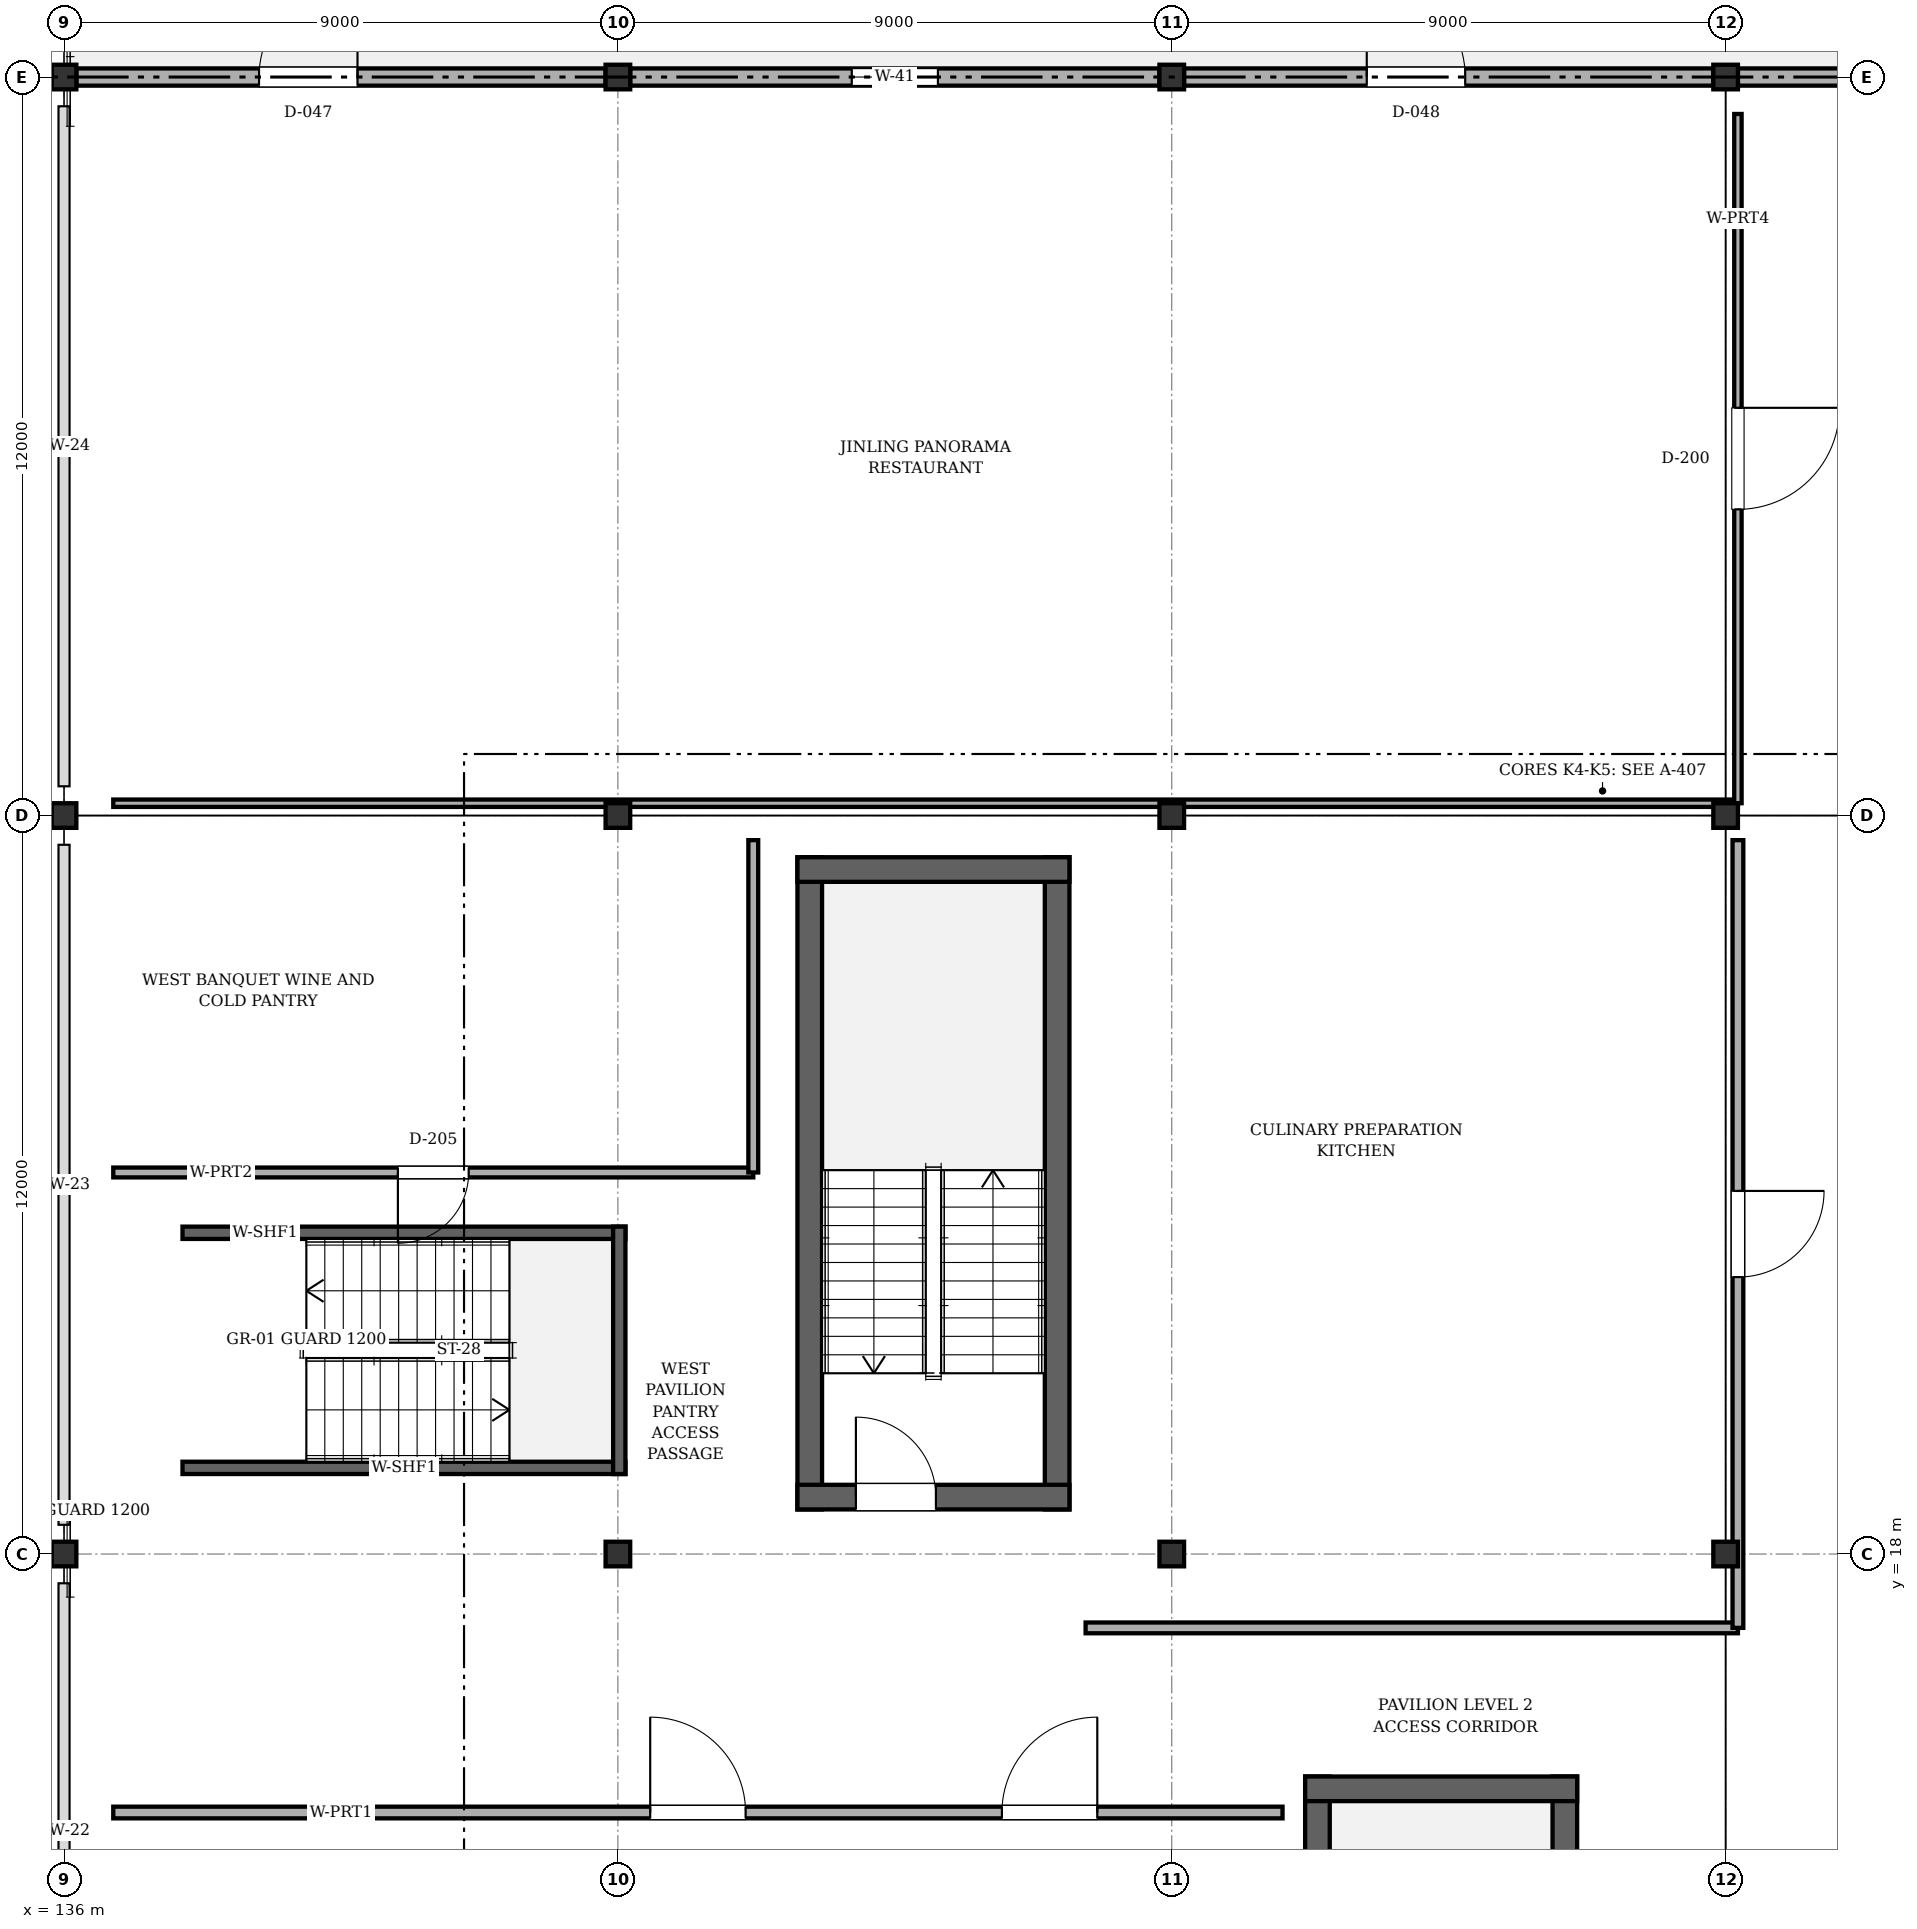
"""IFC4 building model, lengths in metres.
Left out: names, types, materials, properties, quantities, classifications, styles, units other than length and angle.
Written with IfcOpenShell. Run it as: python <this file> out.ifc"""

import sys

from ifc_helpers import new_model, si_unit, direction, frame, frame_2d, origin, origin_2d, place, context, subcontext, project, spatial, rectangle, i_section, extrude, element, fill, save


model = new_model("IFC4")
c1 = context("Model", 3, precision=1e-05, world=origin(), true_north=direction((0.0, 1.0)))
c2 = subcontext(c1, "Body", "Model", "MODEL_VIEW")
j1 = project(units=[si_unit("LENGTHUNIT", "METRE"), si_unit("PLANEANGLEUNIT", "RADIAN")], contexts=[c1])
p1 = place(None, origin())
s1 = spatial("IfcSite", under=j1, at=p1, CompositionType="ELEMENT")
p2 = place(p1, origin())
s2 = spatial("IfcBuilding", under=s1, at=p2, CompositionType="ELEMENT")
p3 = place(p2, frame((0.0, 0.0, 10.8)))
s3 = spatial("IfcBuildingStorey", under=s2, at=p3, CompositionType="ELEMENT", Elevation=10.8)
for number, where, z_axis, x_axis in (
    (1, (136.0, 18.0, 0.0), (0.0, 0.0, 1.0), (1.0, 0.0, 0.0)),
    (2, (136.0, 30.0, 0.0), (0.0, 0.0, 1.0), (1.0, 0.0, 0.0)),
    (3, (136.0, 42.0, 0.0), (0.0, 0.0, 1.0), (1.0, 0.0, 0.0)),
    (4, (145.0, 18.0, 0.0), (0.0, 0.0, 1.0), (1.0, 0.0, 0.0)),
    (5, (145.0, 30.0, 0.0), (0.0, 0.0, 1.0), (1.0, 0.0, 0.0)),
    (6, (145.0, 42.0, 0.0), (0.0, 0.0, 1.0), (1.0, 0.0, 0.0)),
    (7, (154.0, 18.0, 0.0), (0.0, 0.0, 1.0), (1.0, 0.0, 0.0)),
    (8, (154.0, 30.0, 0.0), (0.0, 0.0, 1.0), (1.0, 0.0, 0.0)),
    (9, (154.0, 42.0, 0.0), (0.0, 0.0, 1.0), (1.0, 0.0, 0.0)),
    (10, (163.0, 18.0, 0.0), (0.0, 0.0, 1.0), (1.0, 0.0, 0.0)),
    (11, (163.0, 30.0, 0.0), (0.0, 0.0, 1.0), (1.0, 0.0, 0.0)),
    (12, (163.0, 42.0, 0.0), (0.0, 0.0, 1.0), (1.0, 0.0, 0.0)),
):
    element("IfcColumn", number, at=place(p3, frame(where, z_axis=z_axis, x_axis=x_axis)), inside=s3, PredefinedType="COLUMN", context=c2, shape_type="SweptSolid", body=[
        extrude(i_section(OverallWidth=0.4, OverallDepth=0.4, WebThickness=0.013, FlangeThickness=0.021, FilletRadius=0.022, at=origin_2d()), origin(), (0.0, 0.0, 1.0), 3.6),
    ])
p4 = place(p3, frame((136.2, 42.0, 0.0), z_axis=(0.0, 0.0, 1.0), x_axis=(1.0, 0.0, 0.0)))
e13 = element("IfcWall", 13, at=p4, inside=s3, PredefinedType="SOLIDWALL", context=c2, shape_type="SweptSolid", body=[
    extrude(rectangle(XDim=8.6, YDim=0.28, at=frame_2d((4.3, 0.0))), origin(), (0.0, 0.0, 1.0), 2.795),
])
p5 = place(p4, frame((2.969, 0.0, 0.0)))
e14 = element("IfcOpeningElement", 14, at=p5, cuts=e13, PredefinedType="OPENING", context=c2, shape_type="SweptSolid", body=[
    extrude(rectangle(XDim=1.6, YDim=2.3, at=frame_2d((0.8, 1.15))), frame((0.0, 0.15, 0.0), z_axis=(0.0, -1.0, 0.0), x_axis=(1.0, 0.0, 0.0)), (0.0, 0.0, 1.0), 0.3),
])
p6 = place(p3, frame((145.2, 42.0, 0.0), z_axis=(0.0, 0.0, 1.0), x_axis=(1.0, 0.0, 0.0)))
e15 = element("IfcWall", 15, at=p6, inside=s3, PredefinedType="SOLIDWALL", context=c2, shape_type="SweptSolid", body=[
    extrude(rectangle(XDim=8.6, YDim=0.28, at=frame_2d((4.3, 0.0))), origin(), (0.0, 0.0, 1.0), 2.795),
])
p7 = place(p6, frame((3.6, 0.0, 0.75)))
e16 = element("IfcOpeningElement", 16, at=p7, cuts=e15, PredefinedType="OPENING", context=c2, shape_type="SweptSolid", body=[
    extrude(rectangle(XDim=1.4, YDim=1.55, at=frame_2d((0.7, 0.775))), frame((0.0, 0.15, 0.0), z_axis=(0.0, -1.0, 0.0), x_axis=(1.0, 0.0, 0.0)), (0.0, 0.0, 1.0), 0.3),
])
p8 = place(p3, frame((154.2, 42.0, 0.0), z_axis=(0.0, 0.0, 1.0), x_axis=(1.0, 0.0, 0.0)))
e17 = element("IfcWall", 17, at=p8, inside=s3, PredefinedType="SOLIDWALL", context=c2, shape_type="SweptSolid", body=[
    extrude(rectangle(XDim=8.6, YDim=0.28, at=frame_2d((4.3, 0.0))), origin(), (0.0, 0.0, 1.0), 2.795),
])
p9 = place(p8, frame((2.969, 0.0, 0.0)))
e18 = element("IfcOpeningElement", 18, at=p9, cuts=e17, PredefinedType="OPENING", context=c2, shape_type="SweptSolid", body=[
    extrude(rectangle(XDim=1.6, YDim=2.3, at=frame_2d((0.8, 1.15))), frame((0.0, 0.15, 0.0), z_axis=(0.0, -1.0, 0.0), x_axis=(1.0, 0.0, 0.0)), (0.0, 0.0, 1.0), 0.3),
])
p10 = place(p3, frame((163.2, 42.0, 0.0), z_axis=(0.0, 0.0, 1.0), x_axis=(1.0, 0.0, 0.0)))
e19 = element("IfcWall", 19, at=p10, inside=s3, PredefinedType="SOLIDWALL", context=c2, shape_type="SweptSolid", body=[
    extrude(rectangle(XDim=8.6, YDim=0.28, at=frame_2d((4.3, 0.0))), origin(), (0.0, 0.0, 1.0), 2.795),
])
p11 = place(p10, frame((3.6, 0.0, 0.75)))
e20 = element("IfcOpeningElement", 20, at=p11, cuts=e19, PredefinedType="OPENING", context=c2, shape_type="SweptSolid", body=[
    extrude(rectangle(XDim=1.4, YDim=1.55, at=frame_2d((0.7, 0.775))), frame((0.0, 0.15, 0.0), z_axis=(0.0, -1.0, 0.0), x_axis=(1.0, 0.0, 0.0)), (0.0, 0.0, 1.0), 0.3),
])
for number, where, z_axis, x_axis in (
    (21, (152.137, 18.725, 0.0), (0.0, 0.0, 1.0), (0.0, 1.0, 0.0)),
    (22, (148.117, 29.323, 0.0), (0.0, 0.0, 1.0), (0.0, -1.0, 0.0)),
):
    element("IfcWall", number, at=place(p3, frame(where, z_axis=z_axis, x_axis=x_axis)), inside=s3, PredefinedType="SHEAR", context=c2, shape_type="SweptSolid", body=[
        extrude(rectangle(XDim=10.597, YDim=0.4, at=frame_2d((5.299, 0.0))), origin(), (0.0, 0.0, 1.0), 3.4),
    ])
p12 = place(p3, frame((152.337, 29.123, 0.0), z_axis=(0.0, 0.0, 1.0), x_axis=(-1.0, 0.0, 0.0)))
e23 = element("IfcWall", 23, at=p12, inside=s3, PredefinedType="SHEAR", context=c2, shape_type="SweptSolid", body=[
    extrude(rectangle(XDim=4.42, YDim=0.4, at=frame_2d((2.21, 0.0))), origin(), (0.0, 0.0, 1.0), 3.4),
])
p13 = place(p3, frame((147.917, 18.925, 0.0), z_axis=(0.0, 0.0, 1.0), x_axis=(1.0, 0.0, 0.0)))
e24 = element("IfcWall", 24, at=p13, inside=s3, PredefinedType="SHEAR", context=c2, shape_type="SweptSolid", body=[
    extrude(rectangle(XDim=4.42, YDim=0.4, at=frame_2d((2.21, 0.0))), origin(), (0.0, 0.0, 1.0), 3.4),
])
p14 = place(p13, frame((0.95, 0.0, 0.0)))
e25 = element("IfcOpeningElement", 25, at=p14, cuts=e24, PredefinedType="OPENING", context=c2, shape_type="SweptSolid", body=[
    extrude(rectangle(XDim=1.3, YDim=2.1, at=frame_2d((0.65, 1.05))), frame((0.0, 0.21, 0.0), z_axis=(0.0, -1.0, 0.0), x_axis=(1.0, 0.0, 0.0)), (0.0, 0.0, 1.0), 0.42),
])
p15 = place(p3, frame((160.387, 3.788, 0.0), z_axis=(0.0, 0.0, 1.0), x_axis=(0.0, 1.0, 0.0)))
e26 = element("IfcWall", 26, at=p15, inside=s3, PredefinedType="SHEAR", context=c2, shape_type="SweptSolid", body=[
    extrude(rectangle(XDim=10.597, YDim=0.4, at=frame_2d((5.299, 0.0))), origin(), (0.0, 0.0, 1.0), 3.4),
])
p16 = place(p3, frame((156.367, 14.385, 0.0), z_axis=(0.0, 0.0, 1.0), x_axis=(0.0, -1.0, 0.0)))
e27 = element("IfcWall", 27, at=p16, inside=s3, PredefinedType="SHEAR", context=c2, shape_type="SweptSolid", body=[
    extrude(rectangle(XDim=10.597, YDim=0.4, at=frame_2d((5.299, 0.0))), origin(), (0.0, 0.0, 1.0), 3.4),
])
p17 = place(p16, frame((8.498, 0.0, 0.0)))
e28 = element("IfcOpeningElement", 28, at=p17, cuts=e27, PredefinedType="OPENING", context=c2, shape_type="SweptSolid", body=[
    extrude(rectangle(XDim=1.3, YDim=2.1, at=frame_2d((0.65, 1.05))), frame((0.0, 0.21, 0.0), z_axis=(0.0, -1.0, 0.0), x_axis=(1.0, 0.0, 0.0)), (0.0, 0.0, 1.0), 0.42),
])
p18 = place(p3, frame((160.587, 14.185, 0.0), z_axis=(0.0, 0.0, 1.0), x_axis=(-1.0, 0.0, 0.0)))
e29 = element("IfcWall", 29, at=p18, inside=s3, PredefinedType="SHEAR", context=c2, shape_type="SweptSolid", body=[
    extrude(rectangle(XDim=4.42, YDim=0.4, at=frame_2d((2.21, 0.0))), origin(), (0.0, 0.0, 1.0), 3.4),
])
for number, where, z_axis, x_axis in (
    (30, (137.925, 19.4, 0.0), (0.0, 0.0, 1.0), (1.0, 0.0, 0.0)),
    (31, (145.123, 23.22, 0.0), (0.0, 0.0, 1.0), (-1.0, 0.0, 0.0)),
):
    element("IfcWall", number, at=place(p3, frame(where, z_axis=z_axis, x_axis=x_axis)), inside=s3, PredefinedType="SOLIDWALL", context=c2, shape_type="SweptSolid", body=[
        extrude(rectangle(XDim=7.198, YDim=0.2, at=frame_2d((3.599, 0.0))), origin(), (0.0, 0.0, 1.0), 3.4),
    ])
p19 = place(p3, frame((145.022, 19.3, 0.0), z_axis=(0.0, 0.0, 1.0), x_axis=(0.0, 1.0, 0.0)))
e32 = element("IfcWall", 32, at=p19, inside=s3, PredefinedType="SOLIDWALL", context=c2, shape_type="SweptSolid", body=[
    extrude(rectangle(XDim=4.02, YDim=0.2, at=frame_2d((2.01, 0.0))), origin(), (0.0, 0.0, 1.0), 3.4),
])
p20 = place(p3, frame((163.2, 30.2, 0.0), z_axis=(0.0, 0.0, 1.0), x_axis=(-1.0, 0.0, 0.0)))
e33 = element("IfcWall", 33, at=p20, inside=s3, PredefinedType="PARTITIONING", context=c2, shape_type="SweptSolid", body=[
    extrude(rectangle(XDim=26.4, YDim=0.12, at=frame_2d((13.2, 0.0))), origin(), (0.0, 0.0, 1.0), 2.795),
])
p21 = place(p3, frame((163.2, 41.4, 0.0), z_axis=(0.0, 0.0, 1.0), x_axis=(0.0, -1.0, 0.0)))
e34 = element("IfcWall", 34, at=p21, inside=s3, PredefinedType="PARTITIONING", context=c2, shape_type="SweptSolid", body=[
    extrude(rectangle(XDim=11.2, YDim=0.12, at=frame_2d((5.6, 0.0))), origin(), (0.0, 0.0, 1.0), 2.795),
])
p22 = place(p21, frame((4.775, 0.0, 0.0)))
e35 = element("IfcOpeningElement", 35, at=p22, cuts=e34, PredefinedType="OPENING", context=c2, shape_type="SweptSolid", body=[
    extrude(rectangle(XDim=1.65, YDim=2.1, at=frame_2d((0.825, 1.05))), frame((0.0, 0.07, 0.0), z_axis=(0.0, -1.0, 0.0), x_axis=(1.0, 0.0, 0.0)), (0.0, 0.0, 1.0), 0.14),
])
p23 = place(p3, frame((136.8, 13.8, 0.0), z_axis=(0.0, 0.0, 1.0), x_axis=(1.0, 0.0, 0.0)))
e36 = element("IfcWall", 36, at=p23, inside=s3, PredefinedType="PARTITIONING", context=c2, shape_type="SweptSolid", body=[
    extrude(rectangle(XDim=19.0, YDim=0.19, at=frame_2d((9.5, 0.0))), origin(), (0.0, 0.0, 1.0), 2.985),
])
p24 = place(p23, frame((8.725, 0.0, 0.0)))
e37 = element("IfcOpeningElement", 37, at=p24, cuts=e36, PredefinedType="OPENING", context=c2, shape_type="SweptSolid", body=[
    extrude(rectangle(XDim=1.55, YDim=2.1, at=frame_2d((0.775, 1.05))), frame((0.0, 0.105, 0.0), z_axis=(0.0, -1.0, 0.0), x_axis=(1.0, 0.0, 0.0)), (0.0, 0.0, 1.0), 0.21),
])
p25 = place(p23, frame((14.44, 0.0, 0.0)))
e38 = element("IfcOpeningElement", 38, at=p25, cuts=e36, PredefinedType="OPENING", context=c2, shape_type="SweptSolid", body=[
    extrude(rectangle(XDim=1.55, YDim=2.1, at=frame_2d((0.775, 1.05))), frame((0.0, 0.105, 0.0), z_axis=(0.0, -1.0, 0.0), x_axis=(1.0, 0.0, 0.0)), (0.0, 0.0, 1.0), 0.21),
])
p26 = place(p3, frame((163.2, 16.8, 0.0), z_axis=(0.0, 0.0, 1.0), x_axis=(-1.0, 0.0, 0.0)))
e39 = element("IfcWall", 39, at=p26, inside=s3, PredefinedType="PARTITIONING", context=c2, shape_type="SweptSolid", body=[
    extrude(rectangle(XDim=10.6, YDim=0.175, at=frame_2d((5.3, 0.0))), origin(), (0.0, 0.0, 1.0), 2.985),
])
p27 = place(p3, frame((163.2, 29.6, 0.0), z_axis=(0.0, 0.0, 1.0), x_axis=(0.0, -1.0, 0.0)))
e40 = element("IfcWall", 40, at=p27, inside=s3, PredefinedType="PARTITIONING", context=c2, shape_type="SweptSolid", body=[
    extrude(rectangle(XDim=12.8, YDim=0.175, at=frame_2d((6.4, 0.0))), origin(), (0.0, 0.0, 1.0), 2.795),
])
p28 = place(p27, frame((5.7, 0.0, 0.0)))
e41 = element("IfcOpeningElement", 41, at=p28, cuts=e40, PredefinedType="OPENING", context=c2, shape_type="SweptSolid", body=[
    extrude(rectangle(XDim=1.4, YDim=2.1, at=frame_2d((0.7, 1.05))), frame((0.0, 0.097, 0.0), z_axis=(0.0, -1.0, 0.0), x_axis=(1.0, 0.0, 0.0)), (0.0, 0.0, 1.0), 0.195),
])
p29 = place(p3, frame((147.2, 24.2, 0.0), z_axis=(0.0, 0.0, 1.0), x_axis=(-1.0, 0.0, 0.0)))
e42 = element("IfcWall", 42, at=p29, inside=s3, PredefinedType="PARTITIONING", context=c2, shape_type="SweptSolid", body=[
    extrude(rectangle(XDim=10.4, YDim=0.16, at=frame_2d((5.2, 0.0))), origin(), (0.0, 0.0, 1.0), 2.825),
])
p30 = place(p29, frame((4.625, 0.0, 0.0)))
e43 = element("IfcOpeningElement", 43, at=p30, cuts=e42, PredefinedType="OPENING", context=c2, shape_type="SweptSolid", body=[
    extrude(rectangle(XDim=1.15, YDim=2.1, at=frame_2d((0.575, 1.05))), frame((0.0, 0.09, 0.0), z_axis=(0.0, -1.0, 0.0), x_axis=(1.0, 0.0, 0.0)), (0.0, 0.0, 1.0), 0.18),
])
p31 = place(p3, frame((147.2, 29.6, 0.0), z_axis=(0.0, 0.0, 1.0), x_axis=(0.0, -1.0, 0.0)))
e44 = element("IfcWall", 44, at=p31, inside=s3, PredefinedType="PARTITIONING", context=c2, shape_type="SweptSolid", body=[
    extrude(rectangle(XDim=5.4, YDim=0.16, at=frame_2d((2.7, 0.0))), origin(), (0.0, 0.0, 1.0), 2.905),
])
p32 = place(p5, origin())
e45 = element("IfcDoor", 45, at=p32, inside=s3, OperationType="SINGLE_SWING_RIGHT", PredefinedType="DOOR", context=c2, shape_type="SweptSolid", body=[
    extrude(rectangle(XDim=1.6, YDim=2.3, at=frame_2d((0.8, 1.15))), frame((0.0, 0.025, 0.0), z_axis=(0.0, -1.0, 0.0), x_axis=(1.0, 0.0, 0.0)), (0.0, 0.0, 1.0), 0.05),
])
fill(e14, e45)
p33 = place(p7, origin())
e46 = element("IfcWindow", 46, at=p33, inside=s3, PartitioningType="SINGLE_PANEL", PredefinedType="WINDOW", context=c2, shape_type="SweptSolid", body=[
    extrude(rectangle(XDim=1.4, YDim=1.55, at=frame_2d((0.7, 0.775))), frame((0.0, 0.03, 0.0), z_axis=(0.0, -1.0, 0.0), x_axis=(1.0, 0.0, 0.0)), (0.0, 0.0, 1.0), 0.06),
])
fill(e16, e46)
p34 = place(p9, origin())
e47 = element("IfcDoor", 47, at=p34, inside=s3, OperationType="SINGLE_SWING_LEFT", PredefinedType="DOOR", context=c2, shape_type="SweptSolid", body=[
    extrude(rectangle(XDim=1.6, YDim=2.3, at=frame_2d((0.8, 1.15))), frame((0.0, 0.025, 0.0), z_axis=(0.0, -1.0, 0.0), x_axis=(1.0, 0.0, 0.0)), (0.0, 0.0, 1.0), 0.05),
])
fill(e18, e47)
p35 = place(p14, origin())
e48 = element("IfcDoor", 48, at=p35, inside=s3, OperationType="SINGLE_SWING_LEFT", PredefinedType="DOOR", context=c2, shape_type="SweptSolid", body=[
    extrude(rectangle(XDim=1.3, YDim=2.1, at=frame_2d((0.65, 1.05))), frame((0.0, 0.025, 0.0), z_axis=(0.0, -1.0, 0.0), x_axis=(1.0, 0.0, 0.0)), (0.0, 0.0, 1.0), 0.05),
])
fill(e25, e48)
p36 = place(p22, origin())
e49 = element("IfcDoor", 49, at=p36, inside=s3, OperationType="SINGLE_SWING_LEFT", PredefinedType="DOOR", context=c2, shape_type="SweptSolid", body=[
    extrude(rectangle(XDim=1.65, YDim=2.1, at=frame_2d((0.825, 1.05))), frame((0.0, 0.025, 0.0), z_axis=(0.0, -1.0, 0.0), x_axis=(1.0, 0.0, 0.0)), (0.0, 0.0, 1.0), 0.05),
])
fill(e35, e49)
p37 = place(p24, origin())
e50 = element("IfcDoor", 50, at=p37, inside=s3, OperationType="SINGLE_SWING_LEFT", PredefinedType="DOOR", context=c2, shape_type="SweptSolid", body=[
    extrude(rectangle(XDim=1.55, YDim=2.1, at=frame_2d((0.775, 1.05))), frame((0.0, 0.025, 0.0), z_axis=(0.0, -1.0, 0.0), x_axis=(1.0, 0.0, 0.0)), (0.0, 0.0, 1.0), 0.05),
])
fill(e37, e50)
p38 = place(p25, origin())
e51 = element("IfcDoor", 51, at=p38, inside=s3, OperationType="SINGLE_SWING_RIGHT", PredefinedType="DOOR", context=c2, shape_type="SweptSolid", body=[
    extrude(rectangle(XDim=1.55, YDim=2.1, at=frame_2d((0.775, 1.05))), frame((0.0, 0.025, 0.0), z_axis=(0.0, -1.0, 0.0), x_axis=(1.0, 0.0, 0.0)), (0.0, 0.0, 1.0), 0.05),
])
fill(e38, e51)
p39 = place(p28, origin())
e52 = element("IfcDoor", 52, at=p39, inside=s3, OperationType="SINGLE_SWING_LEFT", PredefinedType="DOOR", context=c2, shape_type="SweptSolid", body=[
    extrude(rectangle(XDim=1.4, YDim=2.1, at=frame_2d((0.7, 1.05))), frame((0.0, 0.025, 0.0), z_axis=(0.0, -1.0, 0.0), x_axis=(1.0, 0.0, 0.0)), (0.0, 0.0, 1.0), 0.05),
])
fill(e41, e52)
p40 = place(p30, origin())
e53 = element("IfcDoor", 53, at=p40, inside=s3, OperationType="SINGLE_SWING_RIGHT", PredefinedType="DOOR", context=c2, shape_type="SweptSolid", body=[
    extrude(rectangle(XDim=1.15, YDim=2.1, at=frame_2d((0.575, 1.05))), frame((0.0, 0.025, 0.0), z_axis=(0.0, -1.0, 0.0), x_axis=(1.0, 0.0, 0.0)), (0.0, 0.0, 1.0), 0.05),
])
fill(e43, e53)
save(model, sys.argv[1])
